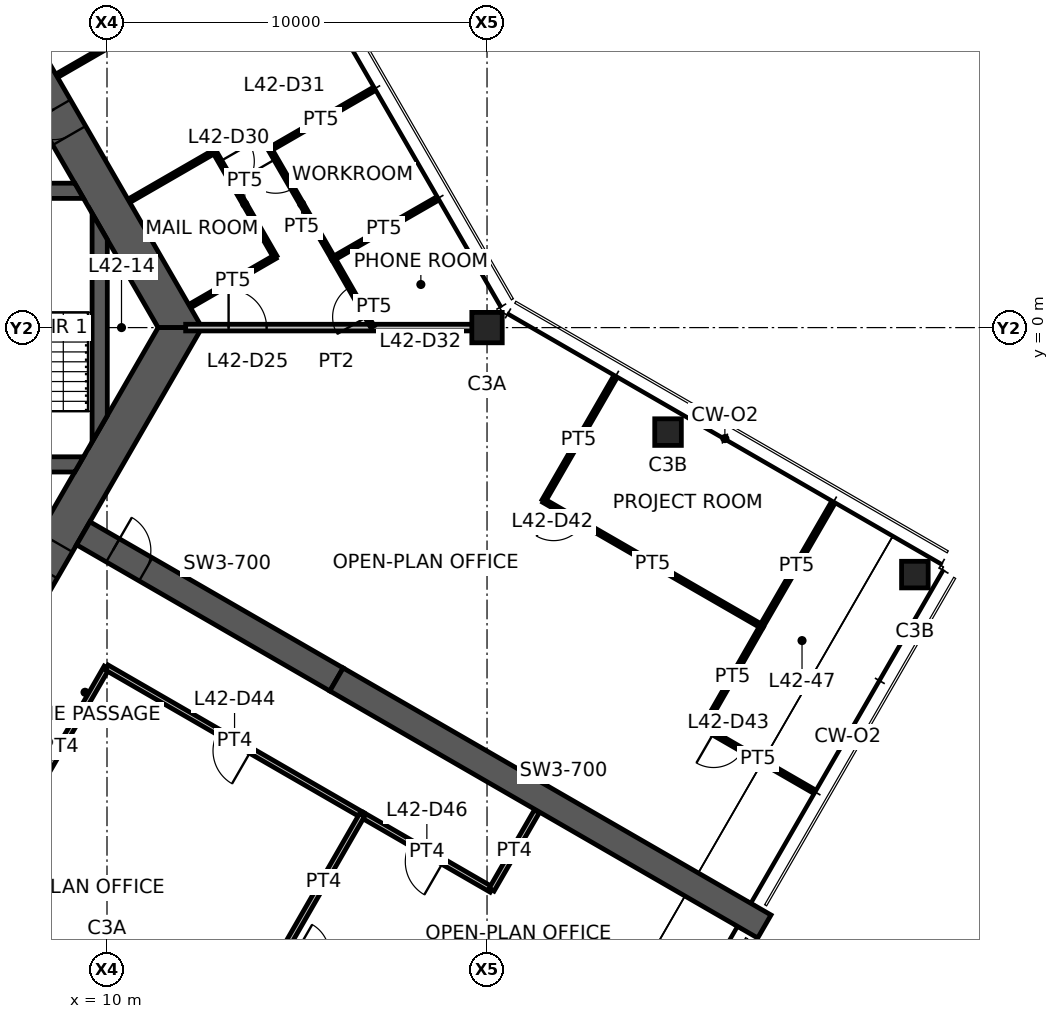
"""IFC4 building model, lengths in metres.
Left out: names, types, materials, properties, quantities, classifications, styles, units other than length and angle.
Written with IfcOpenShell. Run it as: python <this file> out.ifc"""

import sys

from ifc_helpers import new_model, si_unit, direction, frame, frame_2d, origin, origin_2d, place, context, subcontext, project, spatial, polyline, rectangle, hollow_rectangle, outline, extrude, element, fill, save


model = new_model("IFC4")
c1 = context("Model", 3, precision=1e-05, world=origin(), true_north=direction((0.0, 1.0)))
c2 = subcontext(c1, "Body", "Model", "MODEL_VIEW")
j1 = project(units=[si_unit("LENGTHUNIT", "METRE"), si_unit("PLANEANGLEUNIT", "RADIAN")], contexts=[c1])
p1 = place(None, origin())
s1 = spatial("IfcSite", under=j1, at=p1, CompositionType="ELEMENT")
p2 = place(p1, origin())
s2 = spatial("IfcBuilding", under=s1, at=p2, CompositionType="ELEMENT")
p3 = place(p2, frame((0.0, 0.0, 168.2)))
s3 = spatial("IfcBuildingStorey", under=s2, at=p3, CompositionType="ELEMENT", Elevation=168.2)
p4 = place(p3, frame((20.0, 0.0, 0.0), z_axis=(0.0, 0.0, 1.0), x_axis=(1.0, 0.0, 0.0)))
e1 = element("IfcColumn", 1, at=p4, inside=s3, PredefinedType="COLUMN", context=c2, shape_type="SweptSolid", body=[
    extrude(hollow_rectangle(XDim=0.8, YDim=0.8, WallThickness=0.045, at=origin_2d()), origin(), (0.0, 0.0, 1.0), 3.9),
])
for number, where, z_axis, x_axis in (
    (2, (24.763, -2.75, 0.0), (0.0, 0.0, 1.0), (1.0, 0.0, 0.0)),
    (3, (31.258, -6.5, 0.0), (0.0, 0.0, 1.0), (1.0, 0.0, 0.0)),
):
    element("IfcColumn", number, at=place(p3, frame(where, z_axis=z_axis, x_axis=x_axis)), inside=s3, PredefinedType="COLUMN", context=c2, shape_type="SweptSolid", body=[
        extrude(hollow_rectangle(XDim=0.7, YDim=0.7, WallThickness=0.036, at=origin_2d()), origin(), (0.0, 0.0, 1.0), 3.9),
    ])
p5 = place(p3, frame((11.922, 0.0, 0.0), z_axis=(0.0, 0.0, 1.0), x_axis=(-0.500004296715, 0.866022923061, 0.0)))
e4 = element("IfcWall", 4, at=p5, inside=s3, PredefinedType="SHEAR", context=c2, shape_type="SweptSolid", body=[
    extrude(outline(polyline([(-0.289, -0.5), (5.835, -0.5), (6.635, -0.5), (12.211, -0.5), (11.634, 0.5), (6.635, 0.5), (5.835, 0.5), (0.289, 0.5), (-0.289, -0.5)])), origin(), (0.0, 0.0, 1.0), 3.9),
])
p6 = place(p5, frame((5.835, 0.0, 0.0)))
e5 = element("IfcOpeningElement", 5, at=p6, cuts=e4, PredefinedType="OPENING", context=c2, shape_type="SweptSolid", body=[
    extrude(rectangle(XDim=0.8, YDim=2.1, at=frame_2d((0.4, 1.05))), frame((0.0, 0.51, 0.0), z_axis=(0.0, -1.0, 0.0), x_axis=(1.0, 0.0, 0.0)), (0.0, 0.0, 1.0), 1.02),
])
p7 = place(p3, frame((5.961, -10.325, 0.0), z_axis=(0.0, 0.0, 1.0), x_axis=(0.500004296715, 0.866022923061, 0.0)))
e6 = element("IfcWall", 6, at=p7, inside=s3, PredefinedType="SHEAR", context=c2, shape_type="SweptSolid", body=[
    extrude(outline(polyline([(-0.289, -0.5), (4.594, -0.5), (5.394, -0.5), (12.211, -0.5), (11.634, 0.5), (5.394, 0.5), (4.594, 0.5), (0.289, 0.5), (-0.289, -0.5)])), origin(), (0.0, 0.0, 1.0), 3.9),
])
p8 = place(p7, frame((4.594, 0.0, 0.0)))
e7 = element("IfcOpeningElement", 7, at=p8, cuts=e6, PredefinedType="OPENING", context=c2, shape_type="SweptSolid", body=[
    extrude(rectangle(XDim=0.8, YDim=2.1, at=frame_2d((0.4, 1.05))), frame((0.0, 0.51, 0.0), z_axis=(0.0, -1.0, 0.0), x_axis=(1.0, 0.0, 0.0)), (0.0, 0.0, 1.0), 1.02),
])
p9 = place(p3, frame((9.375, -5.413, 0.0), z_axis=(0.0, 0.0, 1.0), x_axis=(0.866032377459, -0.499987921047, 0.0)))
e8 = element("IfcWall", 8, at=p9, inside=s3, PredefinedType="SHEAR", context=c2, shape_type="SweptSolid", body=[
    extrude(rectangle(XDim=7.696, YDim=0.7, at=frame_2d((3.848, 0.0))), origin(), (0.0, 0.0, 1.0), 3.9),
])
p10 = place(p9, frame((0.9, 0.0, 0.0)))
e9 = element("IfcOpeningElement", 9, at=p10, cuts=e8, PredefinedType="OPENING", context=c2, shape_type="SweptSolid", body=[
    extrude(rectangle(XDim=1.0, YDim=2.1, at=frame_2d((0.5, 1.05))), frame((0.0, 0.36, 0.0), z_axis=(0.0, -1.0, 0.0), x_axis=(1.0, 0.0, 0.0)), (0.0, 0.0, 1.0), 0.72),
])
p11 = place(p3, frame((16.039, -9.26, 0.0), z_axis=(0.0, 0.0, 1.0), x_axis=(0.866024837091, -0.50000098154, 0.0)))
e10 = element("IfcWall", 10, at=p11, inside=s3, PredefinedType="SHEAR", context=c2, shape_type="SweptSolid", body=[
    extrude(rectangle(XDim=13.0, YDim=0.7, at=frame_2d((6.5, 0.0))), origin(), (0.0, 0.0, 1.0), 3.9),
])
p12 = place(p3, frame((1.4, 3.6, 0.0), z_axis=(0.0, 0.0, 1.0), x_axis=(1.0, 0.0, 0.0)))
e11 = element("IfcWall", 11, at=p12, inside=s3, PredefinedType="SHEAR", context=c2, shape_type="SweptSolid", body=[
    extrude(outline(polyline([(0.0, -0.2), (3.45, -0.2), (4.75, -0.2), (7.982, -0.2), (7.751, 0.2), (4.75, 0.2), (3.45, 0.2), (0.0, 0.2), (0.0, -0.2)])), origin(), (0.0, 0.0, 1.0), 3.9),
])
p13 = place(p12, frame((3.45, 0.0, 0.0)))
e12 = element("IfcOpeningElement", 12, at=p13, cuts=e11, PredefinedType="OPENING", context=c2, shape_type="SweptSolid", body=[
    extrude(rectangle(XDim=1.3, YDim=2.1, at=frame_2d((0.65, 1.05))), frame((0.0, 0.21, 0.0), z_axis=(0.0, -1.0, 0.0), x_axis=(1.0, 0.0, 0.0)), (0.0, 0.0, 1.0), 0.42),
])
p14 = place(p3, frame((1.4, -3.6, 0.0), z_axis=(0.0, 0.0, 1.0), x_axis=(1.0, 0.0, 0.0)))
e13 = element("IfcWall", 13, at=p14, inside=s3, PredefinedType="SHEAR", context=c2, shape_type="SweptSolid", body=[
    extrude(outline(polyline([(0.0, -0.2), (1.1, -0.2), (2.2, -0.2), (7.751, -0.2), (7.982, 0.2), (2.2, 0.2), (1.1, 0.2), (0.0, 0.2), (0.0, -0.2)])), origin(), (0.0, 0.0, 1.0), 3.9),
])
p15 = place(p14, frame((1.1, 0.0, 0.0)))
e14 = element("IfcOpeningElement", 14, at=p15, cuts=e13, PredefinedType="OPENING", context=c2, shape_type="SweptSolid", body=[
    extrude(rectangle(XDim=1.1, YDim=2.1, at=frame_2d((0.55, 1.05))), frame((0.0, 0.21, 0.0), z_axis=(0.0, -1.0, 0.0), x_axis=(1.0, 0.0, 0.0)), (0.0, 0.0, 1.0), 0.42),
])
p16 = place(p3, frame((9.808, -2.662, 0.0), z_axis=(0.0, 0.0, 1.0), x_axis=(0.0, 1.0, 0.0)))
e15 = element("IfcWall", 15, at=p16, inside=s3, PredefinedType="SHEAR", context=c2, shape_type="SweptSolid", body=[
    extrude(outline(polyline([(0.346, -0.2), (4.978, -0.2), (5.671, 0.2), (-0.346, 0.2), (0.346, -0.2)])), origin(), (0.0, 0.0, 1.0), 3.9),
])
p17 = place(p3, frame((12.07, 0.0, 0.0), z_axis=(0.0, 0.0, 1.0), x_axis=(1.0, 0.0, 0.0)))
e16 = element("IfcWall", 16, at=p17, inside=s3, PredefinedType="PARTITIONING", context=c2, shape_type="SweptSolid", body=[
    extrude(rectangle(XDim=7.93, YDim=0.175, at=frame_2d((3.965, 0.0))), origin(), (0.0, 0.0, 1.0), 3.05),
])
p18 = place(p17, frame((1.13, 0.0, 0.0)))
e17 = element("IfcOpeningElement", 17, at=p18, cuts=e16, PredefinedType="OPENING", context=c2, shape_type="SweptSolid", body=[
    extrude(rectangle(XDim=1.0, YDim=2.1, at=frame_2d((0.5, 1.05))), frame((0.0, 0.098, 0.0), z_axis=(0.0, -1.0, 0.0), x_axis=(1.0, 0.0, 0.0)), (0.0, 0.0, 1.0), 0.195),
])
p19 = place(p3, frame((11.1, 8.025, 0.0), z_axis=(0.0, 0.0, 1.0), x_axis=(-0.866056901187, -0.49994544093, 0.0)))
e18 = element("IfcWall", 18, at=p19, inside=s3, PredefinedType="PARTITIONING", context=c2, shape_type="SweptSolid", body=[
    extrude(rectangle(XDim=2.78, YDim=0.1, at=frame_2d((1.39, 0.0))), origin(), (0.0, 0.0, 1.0), 2.95),
])
p20 = place(p3, frame((10.592, 3.344, 0.0), z_axis=(0.0, 0.0, 1.0), x_axis=(0.866021702275, 0.500006411147, 0.0)))
e19 = element("IfcWall", 19, at=p20, inside=s3, PredefinedType="PARTITIONING", context=c2, shape_type="SweptSolid", body=[
    extrude(rectangle(XDim=2.58, YDim=0.1, at=frame_2d((1.29, 0.0))), origin(), (0.0, 0.0, 1.0), 2.95),
])
p21 = place(p3, frame((12.826, 4.634, 0.0), z_axis=(0.0, 0.0, 1.0), x_axis=(0.500028443584, -0.866008981251, 0.0)))
e20 = element("IfcWall", 20, at=p21, inside=s3, PredefinedType="PARTITIONING", context=c2, shape_type="SweptSolid", body=[
    extrude(rectangle(XDim=3.2, YDim=0.1, at=frame_2d((1.6, 0.0))), origin(), (0.0, 0.0, 1.0), 2.95),
])
p22 = place(p21, frame((0.3, 0.0, 0.0)))
e21 = element("IfcOpeningElement", 21, at=p22, cuts=e20, PredefinedType="OPENING", context=c2, shape_type="SweptSolid", body=[
    extrude(rectangle(XDim=0.9, YDim=2.1, at=frame_2d((0.45, 1.05))), frame((0.0, 0.06, 0.0), z_axis=(0.0, -1.0, 0.0), x_axis=(1.0, 0.0, 0.0)), (0.0, 0.0, 1.0), 0.12),
])
p23 = place(p3, frame((14.427, 1.863, 0.0), z_axis=(0.0, 0.0, 1.0), x_axis=(-0.866045356598, -0.49996543912, 0.0)))
e22 = element("IfcWall", 22, at=p23, inside=s3, PredefinedType="PARTITIONING", context=c2, shape_type="SweptSolid", body=[
    extrude(rectangle(XDim=2.58, YDim=0.1, at=frame_2d((1.29, 0.0))), origin(), (0.0, 0.0, 1.0), 2.95),
])
p24 = place(p3, frame((18.62, 3.351, 0.0), z_axis=(0.0, 0.0, 1.0), x_axis=(-0.866810383216, -0.498637904244, 0.0)))
e23 = element("IfcWall", 23, at=p24, inside=s3, PredefinedType="PARTITIONING", context=c2, shape_type="SweptSolid", body=[
    extrude(rectangle(XDim=3.08, YDim=0.1, at=frame_2d((1.54, 0.0))), origin(), (0.0, 0.0, 1.0), 2.95),
])
p25 = place(p3, frame((14.287, 4.695, 0.0), z_axis=(0.0, 0.0, 1.0), x_axis=(0.866023220135, 0.500003782172, 0.0)))
e24 = element("IfcWall", 24, at=p25, inside=s3, PredefinedType="PARTITIONING", context=c2, shape_type="SweptSolid", body=[
    extrude(rectangle(XDim=3.105, YDim=0.1, at=frame_2d((1.552, 0.0))), origin(), (0.0, 0.0, 1.0), 2.95),
])
p26 = place(p3, frame((15.956, 1.813, 0.0), z_axis=(0.0, 0.0, 1.0), x_axis=(-0.501111387448, 0.865382792393, 0.0)))
e25 = element("IfcWall", 25, at=p26, inside=s3, PredefinedType="PARTITIONING", context=c2, shape_type="SweptSolid", body=[
    extrude(rectangle(XDim=3.331, YDim=0.1, at=frame_2d((1.666, 0.0))), origin(), (0.0, 0.0, 1.0), 2.95),
])
p27 = place(p26, frame((2.131, 0.0, 0.0)))
e26 = element("IfcOpeningElement", 26, at=p27, cuts=e25, PredefinedType="OPENING", context=c2, shape_type="SweptSolid", body=[
    extrude(rectangle(XDim=0.9, YDim=2.1, at=frame_2d((0.45, 1.05))), frame((0.0, 0.06, 0.0), z_axis=(0.0, -1.0, 0.0), x_axis=(1.0, 0.0, 0.0)), (0.0, 0.0, 1.0), 0.12),
])
p28 = place(p3, frame((16.986, 0.02, 0.0), z_axis=(0.0, 0.0, 1.0), x_axis=(-0.498096123952, 0.867121820337, 0.0)))
e27 = element("IfcWall", 27, at=p28, inside=s3, PredefinedType="PARTITIONING", context=c2, shape_type="SweptSolid", body=[
    extrude(rectangle(XDim=2.067, YDim=0.1, at=frame_2d((1.034, 0.0))), origin(), (0.0, 0.0, 1.0), 2.95),
])
p29 = place(p28, frame((0.3, 0.0, 0.0)))
e28 = element("IfcOpeningElement", 28, at=p29, cuts=e27, PredefinedType="OPENING", context=c2, shape_type="SweptSolid", body=[
    extrude(rectangle(XDim=0.9, YDim=2.1, at=frame_2d((0.45, 1.05))), frame((0.0, 0.06, 0.0), z_axis=(0.0, -1.0, 0.0), x_axis=(1.0, 0.0, 0.0)), (0.0, 0.0, 1.0), 0.12),
])
p30 = place(p3, frame((29.077, -4.658, 0.0), z_axis=(0.0, 0.0, 1.0), x_axis=(-0.501275229052, -0.865287897026, 0.0)))
e29 = element("IfcWall", 29, at=p30, inside=s3, PredefinedType="PARTITIONING", context=c2, shape_type="SweptSolid", body=[
    extrude(rectangle(XDim=3.705, YDim=0.1, at=frame_2d((1.853, 0.0))), origin(), (0.0, 0.0, 1.0), 2.95),
])
p31 = place(p3, frame((21.492, -4.557, 0.0), z_axis=(0.0, 0.0, 1.0), x_axis=(0.500013413428, 0.866017659399, 0.0)))
e30 = element("IfcWall", 30, at=p31, inside=s3, PredefinedType="PARTITIONING", context=c2, shape_type="SweptSolid", body=[
    extrude(rectangle(XDim=3.68, YDim=0.1, at=frame_2d((1.84, 0.0))), origin(), (0.0, 0.0, 1.0), 2.95),
])
p32 = place(p3, frame((27.227, -7.863, 0.0), z_axis=(0.0, 0.0, 1.0), x_axis=(-0.866343956507, 0.499447844147, 0.0)))
e31 = element("IfcWall", 31, at=p32, inside=s3, PredefinedType="PARTITIONING", context=c2, shape_type="SweptSolid", body=[
    extrude(rectangle(XDim=6.62, YDim=0.1, at=frame_2d((3.31, 0.0))), origin(), (0.0, 0.0, 1.0), 2.95),
])
p33 = place(p32, frame((5.42, 0.0, 0.0)))
e32 = element("IfcOpeningElement", 32, at=p33, cuts=e31, PredefinedType="OPENING", context=c2, shape_type="SweptSolid", body=[
    extrude(rectangle(XDim=0.9, YDim=2.1, at=frame_2d((0.45, 1.05))), frame((0.0, 0.06, 0.0), z_axis=(0.0, -1.0, 0.0), x_axis=(1.0, 0.0, 0.0)), (0.0, 0.0, 1.0), 0.12),
])
p34 = place(p3, frame((25.7, -10.527, 0.0), z_axis=(0.0, 0.0, 1.0), x_axis=(0.497097650811, 0.867694603855, 0.0)))
e33 = element("IfcWall", 33, at=p34, inside=s3, PredefinedType="PARTITIONING", context=c2, shape_type="SweptSolid", body=[
    extrude(rectangle(XDim=3.071, YDim=0.1, at=frame_2d((1.535, 0.0))), origin(), (0.0, 0.0, 1.0), 2.95),
])
p35 = place(p3, frame((28.562, -12.18, 0.0), z_axis=(0.0, 0.0, 1.0), x_axis=(-0.866020751647, 0.500008057651, 0.0)))
e34 = element("IfcWall", 34, at=p35, inside=s3, PredefinedType="PARTITIONING", context=c2, shape_type="SweptSolid", body=[
    extrude(rectangle(XDim=3.305, YDim=0.1, at=frame_2d((1.653, 0.0))), origin(), (0.0, 0.0, 1.0), 2.95),
])
p36 = place(p35, frame((2.105, 0.0, 0.0)))
e35 = element("IfcOpeningElement", 35, at=p36, cuts=e34, PredefinedType="OPENING", context=c2, shape_type="SweptSolid", body=[
    extrude(rectangle(XDim=0.9, YDim=2.1, at=frame_2d((0.45, 1.05))), frame((0.0, 0.06, 0.0), z_axis=(0.0, -1.0, 0.0), x_axis=(1.0, 0.0, 0.0)), (0.0, 0.0, 1.0), 0.12),
])
p37 = place(p3, frame((9.992, -8.944, 0.0), z_axis=(0.0, 0.0, 1.0), x_axis=(-0.500033248206, -0.866006207073, 0.0)))
e36 = element("IfcWall", 36, at=p37, inside=s3, PredefinedType="PARTITIONING", context=c2, shape_type="SweptSolid", body=[
    extrude(rectangle(XDim=4.828, YDim=0.15, at=frame_2d((2.414, 0.0))), origin(), (0.0, 0.0, 1.0), 2.95),
])
p38 = place(p3, frame((16.721, -12.83, 0.0), z_axis=(0.0, 0.0, 1.0), x_axis=(-0.866020780657, 0.500008007406, 0.0)))
e37 = element("IfcWall", 37, at=p38, inside=s3, PredefinedType="PARTITIONING", context=c2, shape_type="SweptSolid", body=[
    extrude(rectangle(XDim=7.771, YDim=0.15, at=frame_2d((3.885, 0.0))), origin(), (0.0, 0.0, 1.0), 2.95),
])
p39 = place(p38, frame((3.385, 0.0, 0.0)))
e38 = element("IfcOpeningElement", 38, at=p39, cuts=e37, PredefinedType="OPENING", context=c2, shape_type="SweptSolid", body=[
    extrude(rectangle(XDim=1.0, YDim=2.1, at=frame_2d((0.5, 1.05))), frame((0.0, 0.085, 0.0), z_axis=(0.0, -1.0, 0.0), x_axis=(1.0, 0.0, 0.0)), (0.0, 0.0, 1.0), 0.17),
])
p40 = place(p3, frame((20.12, -14.792, 0.0), z_axis=(0.0, 0.0, 1.0), x_axis=(-0.866038848349, 0.499976712608, 0.0)))
e39 = element("IfcWall", 39, at=p40, inside=s3, PredefinedType="PARTITIONING", context=c2, shape_type="SweptSolid", body=[
    extrude(rectangle(XDim=3.934, YDim=0.15, at=frame_2d((1.967, 0.0))), origin(), (0.0, 0.0, 1.0), 2.95),
])
p41 = place(p40, frame((1.467, 0.0, 0.0)))
e40 = element("IfcOpeningElement", 40, at=p41, cuts=e39, PredefinedType="OPENING", context=c2, shape_type="SweptSolid", body=[
    extrude(rectangle(XDim=1.0, YDim=2.1, at=frame_2d((0.5, 1.05))), frame((0.0, 0.085, 0.0), z_axis=(0.0, -1.0, 0.0), x_axis=(1.0, 0.0, 0.0)), (0.0, 0.0, 1.0), 0.17),
])
p42 = place(p3, frame((21.31, -12.731, 0.0), z_axis=(0.0, 0.0, 1.0), x_axis=(-0.500077627542, -0.865980580863, 0.0)))
e41 = element("IfcWall", 41, at=p42, inside=s3, PredefinedType="PARTITIONING", context=c2, shape_type="SweptSolid", body=[
    extrude(rectangle(XDim=2.38, YDim=0.15, at=frame_2d((1.19, 0.0))), origin(), (0.0, 0.0, 1.0), 2.95),
])
p43 = place(p3, frame((16.713, -12.825, 0.0), z_axis=(0.0, 0.0, 1.0), x_axis=(-0.498976779382, -0.866615355067, 0.0)))
e42 = element("IfcWall", 42, at=p43, inside=s3, PredefinedType="PARTITIONING", context=c2, shape_type="SweptSolid", body=[
    extrude(rectangle(XDim=4.054, YDim=0.15, at=frame_2d((2.027, 0.0))), origin(), (0.0, 0.0, 1.0), 2.95),
])
p44 = place(p6, origin())
e43 = element("IfcDoor", 43, at=p44, inside=s3, OperationType="SINGLE_SWING_RIGHT", PredefinedType="DOOR", context=c2, shape_type="SweptSolid", body=[
    extrude(rectangle(XDim=0.8, YDim=2.1, at=frame_2d((0.4, 1.05))), frame((0.0, 0.025, 0.0), z_axis=(0.0, -1.0, 0.0), x_axis=(1.0, 0.0, 0.0)), (0.0, 0.0, 1.0), 0.05),
])
fill(e5, e43)
p45 = place(p8, origin())
e44 = element("IfcDoor", 44, at=p45, inside=s3, OperationType="SINGLE_SWING_LEFT", PredefinedType="DOOR", context=c2, shape_type="SweptSolid", body=[
    extrude(rectangle(XDim=0.8, YDim=2.1, at=frame_2d((0.4, 1.05))), frame((0.0, 0.025, 0.0), z_axis=(0.0, -1.0, 0.0), x_axis=(1.0, 0.0, 0.0)), (0.0, 0.0, 1.0), 0.05),
])
fill(e7, e44)
p46 = place(p10, origin())
e45 = element("IfcDoor", 45, at=p46, inside=s3, OperationType="SINGLE_SWING_LEFT", PredefinedType="DOOR", context=c2, shape_type="SweptSolid", body=[
    extrude(rectangle(XDim=1.0, YDim=2.1, at=frame_2d((0.5, 1.05))), frame((0.0, 0.025, 0.0), z_axis=(0.0, -1.0, 0.0), x_axis=(1.0, 0.0, 0.0)), (0.0, 0.0, 1.0), 0.05),
])
fill(e9, e45)
p47 = place(p18, origin())
e46 = element("IfcDoor", 46, at=p47, inside=s3, OperationType="SINGLE_SWING_LEFT", PredefinedType="DOOR", context=c2, shape_type="SweptSolid", body=[
    extrude(rectangle(XDim=1.0, YDim=2.1, at=frame_2d((0.5, 1.05))), frame((0.0, 0.025, 0.0), z_axis=(0.0, -1.0, 0.0), x_axis=(1.0, 0.0, 0.0)), (0.0, 0.0, 1.0), 0.05),
])
fill(e17, e46)
p48 = place(p22, origin())
e47 = element("IfcDoor", 47, at=p48, inside=s3, OperationType="SINGLE_SWING_LEFT", PredefinedType="DOOR", context=c2, shape_type="SweptSolid", body=[
    extrude(rectangle(XDim=0.9, YDim=2.1, at=frame_2d((0.45, 1.05))), frame((0.0, 0.025, 0.0), z_axis=(0.0, -1.0, 0.0), x_axis=(1.0, 0.0, 0.0)), (0.0, 0.0, 1.0), 0.05),
])
fill(e21, e47)
p49 = place(p27, origin())
e48 = element("IfcDoor", 48, at=p49, inside=s3, OperationType="SINGLE_SWING_RIGHT", PredefinedType="DOOR", context=c2, shape_type="SweptSolid", body=[
    extrude(rectangle(XDim=0.9, YDim=2.1, at=frame_2d((0.45, 1.05))), frame((0.0, 0.025, 0.0), z_axis=(0.0, -1.0, 0.0), x_axis=(1.0, 0.0, 0.0)), (0.0, 0.0, 1.0), 0.05),
])
fill(e26, e48)
p50 = place(p29, origin())
e49 = element("IfcDoor", 49, at=p50, inside=s3, OperationType="SINGLE_SWING_LEFT", PredefinedType="DOOR", context=c2, shape_type="SweptSolid", body=[
    extrude(rectangle(XDim=0.9, YDim=2.1, at=frame_2d((0.45, 1.05))), frame((0.0, 0.025, 0.0), z_axis=(0.0, -1.0, 0.0), x_axis=(1.0, 0.0, 0.0)), (0.0, 0.0, 1.0), 0.05),
])
fill(e28, e49)
p51 = place(p33, origin())
e50 = element("IfcDoor", 50, at=p51, inside=s3, OperationType="SINGLE_SWING_RIGHT", PredefinedType="DOOR", context=c2, shape_type="SweptSolid", body=[
    extrude(rectangle(XDim=0.9, YDim=2.1, at=frame_2d((0.45, 1.05))), frame((0.0, 0.025, 0.0), z_axis=(0.0, -1.0, 0.0), x_axis=(1.0, 0.0, 0.0)), (0.0, 0.0, 1.0), 0.05),
])
fill(e32, e50)
p52 = place(p36, origin())
e51 = element("IfcDoor", 51, at=p52, inside=s3, OperationType="SINGLE_SWING_RIGHT", PredefinedType="DOOR", context=c2, shape_type="SweptSolid", body=[
    extrude(rectangle(XDim=0.9, YDim=2.1, at=frame_2d((0.45, 1.05))), frame((0.0, 0.025, 0.0), z_axis=(0.0, -1.0, 0.0), x_axis=(1.0, 0.0, 0.0)), (0.0, 0.0, 1.0), 0.05),
])
fill(e35, e51)
p53 = place(p39, origin())
e52 = element("IfcDoor", 52, at=p53, inside=s3, OperationType="SINGLE_SWING_LEFT", PredefinedType="DOOR", context=c2, shape_type="SweptSolid", body=[
    extrude(rectangle(XDim=1.0, YDim=2.1, at=frame_2d((0.5, 1.05))), frame((0.0, 0.025, 0.0), z_axis=(0.0, -1.0, 0.0), x_axis=(1.0, 0.0, 0.0)), (0.0, 0.0, 1.0), 0.05),
])
fill(e38, e52)
p54 = place(p41, origin())
e53 = element("IfcDoor", 53, at=p54, inside=s3, OperationType="SINGLE_SWING_LEFT", PredefinedType="DOOR", context=c2, shape_type="SweptSolid", body=[
    extrude(rectangle(XDim=1.0, YDim=2.1, at=frame_2d((0.5, 1.05))), frame((0.0, 0.025, 0.0), z_axis=(0.0, -1.0, 0.0), x_axis=(1.0, 0.0, 0.0)), (0.0, 0.0, 1.0), 0.05),
])
fill(e40, e53)
save(model, sys.argv[1])
